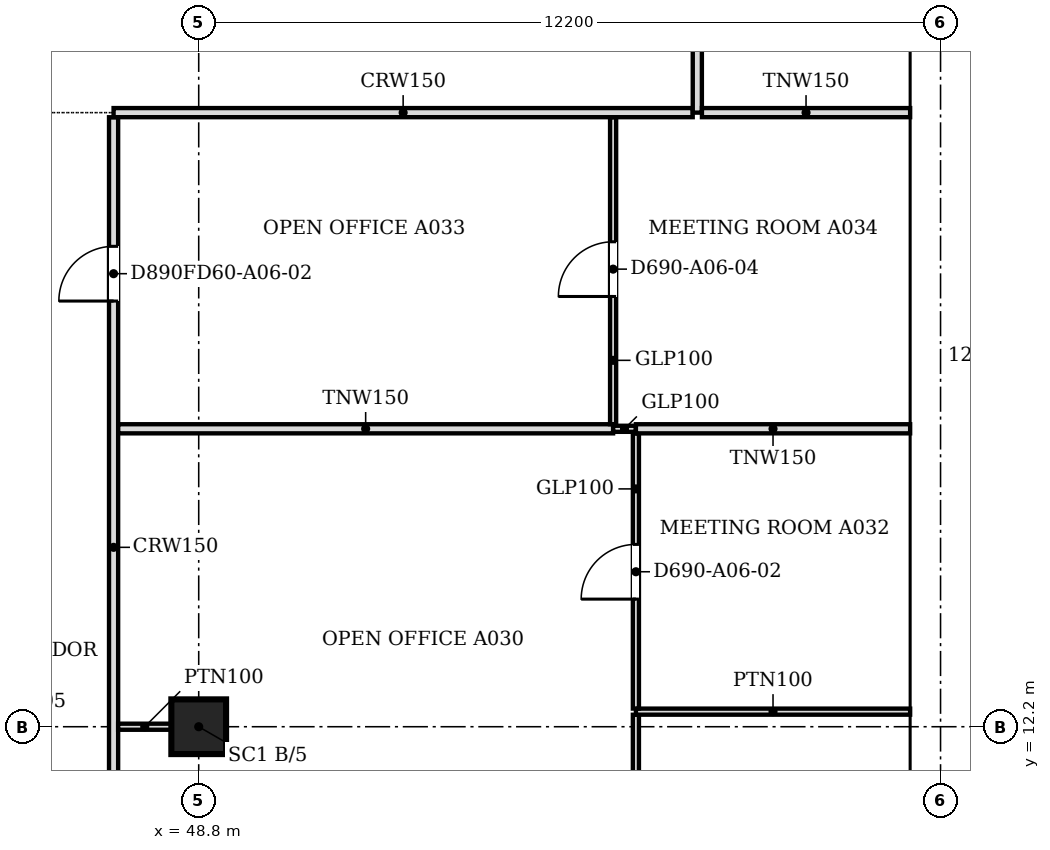
"""IFC4 building model, lengths in metres.
Left out: names, types, materials, properties, quantities, classifications, styles, units other than length and angle.
Written with IfcOpenShell. Run it as: python <this file> out.ifc"""

import sys

from ifc_helpers import new_model, si_unit, direction, frame, frame_2d, origin, origin_2d, place, context, subcontext, project, spatial, polyline, rectangle, outline, extrude, faceted_brep, source, transform, mapped, element, fill, save


model = new_model("IFC4")
c1 = context("Model", 3, precision=1e-05, world=origin(), true_north=direction((0.0, 1.0)))
c2 = subcontext(c1, "Body", "Model", "MODEL_VIEW")
j1 = project(units=[si_unit("LENGTHUNIT", "METRE"), si_unit("PLANEANGLEUNIT", "RADIAN")], contexts=[c1])
p1 = place(None, origin())
s1 = spatial("IfcSite", under=j1, at=p1, CompositionType="ELEMENT")
p2 = place(p1, origin())
s2 = spatial("IfcBuilding", under=s1, at=p2, CompositionType="ELEMENT")
p3 = place(p2, frame((0.0, 0.0, 68.6)))
s3 = spatial("IfcBuildingStorey", under=s2, at=p3, CompositionType="ELEMENT", Elevation=68.6)
p4 = place(p3, frame((48.8, 12.2, 0.0), z_axis=(0.0, 0.0, 1.0), x_axis=(1.0, 0.0, 0.0)))
e1 = element("IfcColumn", 1, at=p4, inside=s3, PredefinedType="COLUMN", context=c2, shape_type="SweptSolid", body=[
    extrude(rectangle(XDim=0.9, YDim=0.9, at=origin_2d()), origin(), (0.0, 0.0, 1.0), 3.6),
])
m1 = source(origin(), c2, "Body", "Brep", [
    faceted_brep([(6.053, -0.25, 0.0), (3.003, -0.25, 3.8), (0.0, -0.25, 0.0), (0.047, 0.25, 0.059), (3.003, 0.25, 3.8), (6.053, 0.25, 0.0), (0.047, 0.25, 0.0), (0.0, 0.0, 0.0)], [[[0, 1, 2]], [[3, 4, 5, 6]], [[5, 4, 1, 0]], [[4, 3, 7, 2, 1]], [[6, 5, 0, 2, 7]], [[6, 7, 3]]]),
])
p5 = place(p3, frame((60.75, 6.146, 0.0), z_axis=(0.0, 0.0, 1.0), x_axis=(0.0, 1.0, 0.0)))
e2 = element("IfcWall", 2, at=p5, inside=s3, PredefinedType="SOLIDWALL", context=c2, shape_type="MappedRepresentation", body=[
    mapped(m1, transform((0.0, 0.0, 0.0), scale=1.0)),
])
m2 = source(origin(), c2, "Body", "SweptSolid", [
    extrude(outline(polyline([(5.532, 0.25), (3.005, 3.399), (0.516, 0.25), (5.532, 0.25)])), frame((0.0, 0.26, 0.0), z_axis=(0.0, -1.0, 0.0), x_axis=(1.0, 0.0, 0.0)), (0.0, 0.0, 1.0), 0.52),
])
p6 = place(p5, origin())
e3 = element("IfcOpeningElement", 3, at=p6, cuts=e2, PredefinedType="OPENING", context=c2, shape_type="MappedRepresentation", body=[
    mapped(m2, transform((0.0, 0.0, 0.0), scale=1.0)),
])
m3 = source(origin(), c2, "Body", "SweptSolid", [
    extrude(outline(polyline([(6.1, 0.0), (3.05, 3.8), (0.0, 0.0), (6.1, 0.0)])), frame((0.0, 0.25, 0.0), z_axis=(0.0, -1.0, 0.0), x_axis=(1.0, 0.0, 0.0)), (0.0, 0.0, 1.0), 0.5),
])
p7 = place(p3, frame((60.75, 12.2, 0.0), z_axis=(0.0, 0.0, 1.0), x_axis=(0.0, 1.0, 0.0)))
e4 = element("IfcWall", 4, at=p7, inside=s3, PredefinedType="SOLIDWALL", context=c2, shape_type="MappedRepresentation", body=[
    mapped(m3, transform((0.0, 0.0, 0.0), scale=1.0)),
])
m4 = source(origin(), c2, "Body", "SweptSolid", [
    extrude(outline(polyline([(5.579, 0.25), (3.05, 3.4), (0.521, 0.25), (5.579, 0.25)])), frame((0.0, 0.26, 0.0), z_axis=(0.0, -1.0, 0.0), x_axis=(1.0, 0.0, 0.0)), (0.0, 0.0, 1.0), 0.52),
])
p8 = place(p7, origin())
e5 = element("IfcOpeningElement", 5, at=p8, cuts=e4, PredefinedType="OPENING", context=c2, shape_type="MappedRepresentation", body=[
    mapped(m4, transform((0.0, 0.0, 0.0), scale=1.0)),
])
m5 = source(origin(), c2, "Body", "Brep", [
    faceted_brep([(6.1, -0.25, 0.0), (3.05, -0.25, 3.8), (0.0, -0.25, 0.0), (6.1, -0.25, 0.0), (0.0, 0.25, 0.0), (3.05, 0.25, 3.8), (6.1, 0.25, 0.0), (6.1, 0.25, 0.0)], [[[0, 1, 2, 3]], [[4, 5, 6, 7]], [[6, 5, 1, 0]], [[5, 4, 2, 1]], [[4, 7, 3, 2]], [[3, 7, 6, 0]]]),
])
p9 = place(p3, frame((60.75, 18.3, 0.0), z_axis=(0.0, 0.0, 1.0), x_axis=(0.0, 1.0, 0.0)))
e6 = element("IfcWall", 6, at=p9, inside=s3, PredefinedType="SOLIDWALL", context=c2, shape_type="MappedRepresentation", body=[
    mapped(m5, transform((0.0, 0.0, 0.0), scale=1.0)),
])
p10 = place(p9, origin())
e7 = element("IfcOpeningElement", 7, at=p10, cuts=e6, PredefinedType="OPENING", context=c2, shape_type="MappedRepresentation", body=[
    mapped(m4, transform((0.0, 0.0, 0.0), scale=1.0)),
])
p11 = place(p2, frame((0.0, 0.0, 72.4)))
s4 = spatial("IfcBuildingStorey", under=s2, at=p11, CompositionType="ELEMENT", Elevation=72.4)
m6 = source(origin(), c2, "Body", "SweptSolid", [
    extrude(outline(polyline([(3.05, 0.0), (6.1, 3.8), (3.05, 7.6), (0.0, 3.8), (3.05, 0.0)])), frame((0.0, 0.25, 0.0), z_axis=(0.0, -1.0, 0.0), x_axis=(1.0, 0.0, 0.0)), (0.0, 0.0, 1.0), 0.5),
])
p12 = place(p11, frame((60.75, 9.15, -3.8), z_axis=(0.0, 0.0, 1.0), x_axis=(0.0, 1.0, 0.0)))
e8 = element("IfcWall", 8, at=p12, inside=s4, PredefinedType="SOLIDWALL", context=c2, shape_type="MappedRepresentation", body=[
    mapped(m6, transform((0.0, 0.0, 0.0), scale=1.0)),
])
m7 = source(origin(), c2, "Body", "SweptSolid", [
    extrude(outline(polyline([(3.05, 0.399), (5.78, 3.8), (3.05, 7.2), (0.321, 3.8), (3.05, 0.399)])), frame((0.0, 0.26, 0.0), z_axis=(0.0, -1.0, 0.0), x_axis=(1.0, 0.0, 0.0)), (0.0, 0.0, 1.0), 0.52),
])
p13 = place(p12, origin())
e9 = element("IfcOpeningElement", 9, at=p13, cuts=e8, PredefinedType="OPENING", context=c2, shape_type="MappedRepresentation", body=[
    mapped(m7, transform((0.0, 0.0, 0.0), scale=1.0)),
])
p14 = place(p11, frame((60.75, 15.25, -3.8), z_axis=(0.0, 0.0, 1.0), x_axis=(0.0, 1.0, 0.0)))
e10 = element("IfcWall", 10, at=p14, inside=s4, PredefinedType="SOLIDWALL", context=c2, shape_type="MappedRepresentation", body=[
    mapped(m6, transform((0.0, 0.0, 0.0), scale=1.0)),
])
p15 = place(p14, origin())
e11 = element("IfcOpeningElement", 11, at=p15, cuts=e10, PredefinedType="OPENING", context=c2, shape_type="MappedRepresentation", body=[
    mapped(m7, transform((0.0, 0.0, 0.0), scale=1.0)),
])
m8 = source(origin(), c2, "Body", "Brep", [
    faceted_brep([(3.05, -0.25, 0.0), (6.1, -0.25, 3.8), (6.1, -0.25, 3.8), (3.05, -0.25, 7.6), (0.0, -0.25, 3.8), (0.0, 0.25, 3.8), (3.05, 0.25, 7.6), (6.1, 0.25, 3.8), (6.1, 0.25, 3.8), (3.05, 0.25, 0.0)], [[[0, 1, 2, 3, 4]], [[5, 6, 7, 8, 9]], [[9, 8, 1, 0]], [[7, 6, 3, 2]], [[6, 5, 4, 3]], [[5, 9, 0, 4]], [[1, 8, 7, 2]]]),
])
p16 = place(p11, frame((60.75, 21.35, -3.8), z_axis=(0.0, 0.0, 1.0), x_axis=(0.0, 1.0, 0.0)))
e12 = element("IfcWall", 12, at=p16, inside=s4, PredefinedType="SOLIDWALL", context=c2, shape_type="MappedRepresentation", body=[
    mapped(m8, transform((0.0, 0.0, 0.0), scale=1.0)),
])
p17 = place(p16, origin())
e13 = element("IfcOpeningElement", 13, at=p17, cuts=e12, PredefinedType="OPENING", context=c2, shape_type="MappedRepresentation", body=[
    mapped(m7, transform((0.0, 0.0, 0.0), scale=1.0)),
])
p18 = place(p3, frame((47.4, 22.224, 0.0), z_axis=(0.0, 0.0, 1.0), x_axis=(0.0, -1.0, 0.0)))
e14 = element("IfcWall", 14, at=p18, inside=s3, PredefinedType="PARTITIONING", context=c2, shape_type="SweptSolid", body=[
    extrude(rectangle(XDim=18.024, YDim=0.15, at=frame_2d((9.012, 0.0))), origin(), (0.0, 0.0, 1.0), 3.067),
])
m9 = source(origin(), c2, "Body", "SweptSolid", [
    extrude(rectangle(XDim=0.9, YDim=2.1, at=frame_2d((0.45, 1.05))), frame((0.0, 0.085, 0.0), z_axis=(0.0, -1.0, 0.0), x_axis=(1.0, 0.0, 0.0)), (0.0, 0.0, 1.0), 0.17),
])
p19 = place(p18, frame((2.123, 0.0, 0.0)))
e15 = element("IfcOpeningElement", 15, at=p19, cuts=e14, PredefinedType="OPENING", context=c2, shape_type="MappedRepresentation", body=[
    mapped(m9, transform((0.0, 0.0, 0.0), scale=1.0)),
])
p20 = place(p18, frame((11.124, 0.0, 0.0)))
e16 = element("IfcOpeningElement", 16, at=p20, cuts=e14, PredefinedType="OPENING", context=c2, shape_type="MappedRepresentation", body=[
    mapped(m9, transform((0.0, 0.0, 0.0), scale=1.0)),
])
p21 = place(p3, frame((55.99, 12.397, 0.0), z_axis=(0.0, 0.0, 1.0), x_axis=(0.0, -1.0, 0.0)))
e17 = element("IfcWall", 17, at=p21, inside=s3, PredefinedType="PARTITIONING", context=c2, shape_type="SweptSolid", body=[
    extrude(rectangle(XDim=4.297, YDim=0.1, at=frame_2d((2.148, 0.0))), origin(), (0.0, 0.0, 1.0), 3.067),
])
m10 = source(origin(), c2, "Body", "SweptSolid", [
    extrude(rectangle(XDim=0.9, YDim=2.1, at=frame_2d((0.45, 1.05))), frame((0.0, 0.06, 0.0), z_axis=(0.0, -1.0, 0.0), x_axis=(1.0, 0.0, 0.0)), (0.0, 0.0, 1.0), 0.12),
])
p22 = place(p21, frame((1.697, 0.0, 0.0)))
e18 = element("IfcOpeningElement", 18, at=p22, cuts=e17, PredefinedType="OPENING", context=c2, shape_type="MappedRepresentation", body=[
    mapped(m10, transform((0.0, 0.0, 0.0), scale=1.0)),
])
p23 = place(p3, frame((48.35, 12.2, 0.0), z_axis=(0.0, 0.0, 1.0), x_axis=(-1.0, 0.0, 0.0)))
e19 = element("IfcWall", 19, at=p23, inside=s3, PredefinedType="PARTITIONING", context=c2, shape_type="SweptSolid", body=[
    extrude(rectangle(XDim=0.875, YDim=0.1, at=frame_2d((0.438, 0.0))), origin(), (0.0, 0.0, 1.0), 3.067),
])
p24 = place(p3, frame((55.99, 12.448, 0.0), z_axis=(0.0, 0.0, 1.0), x_axis=(1.0, 0.0, 0.0)))
e20 = element("IfcWall", 20, at=p24, inside=s3, PredefinedType="PARTITIONING", context=c2, shape_type="SweptSolid", body=[
    extrude(rectangle(XDim=4.51, YDim=0.1, at=frame_2d((2.255, 0.0))), origin(), (0.0, 0.0, 1.0), 3.067),
])
p25 = place(p3, frame((55.99, 17.024, 0.0), z_axis=(0.0, 0.0, 1.0), x_axis=(0.0, -1.0, 0.0)))
e21 = element("IfcWall", 21, at=p25, inside=s3, PredefinedType="PARTITIONING", context=c2, shape_type="SweptSolid", body=[
    extrude(rectangle(XDim=4.525, YDim=0.1, at=frame_2d((2.263, 0.0))), origin(), (0.0, 0.0, 1.0), 3.067),
])
p26 = place(p25, frame((1.825, 0.0, 0.0)))
e22 = element("IfcOpeningElement", 22, at=p26, cuts=e21, PredefinedType="OPENING", context=c2, shape_type="MappedRepresentation", body=[
    mapped(m10, transform((0.0, 0.0, 0.0), scale=1.0)),
])
p27 = place(p3, frame((47.476, 17.1, 0.0), z_axis=(0.0, 0.0, 1.0), x_axis=(1.0, 0.0, 0.0)))
e23 = element("IfcWall", 23, at=p27, inside=s3, PredefinedType="PARTITIONING", context=c2, shape_type="SweptSolid", body=[
    extrude(rectangle(XDim=8.139, YDim=0.15, at=frame_2d((4.069, 0.0))), origin(), (0.0, 0.0, 1.0), 3.067),
])
p28 = place(p3, frame((55.616, 17.1, 0.0), z_axis=(0.0, 0.0, 1.0), x_axis=(1.0, 0.0, 0.0)))
e24 = element("IfcWall", 24, at=p28, inside=s3, PredefinedType="PARTITIONING", context=c2, shape_type="SweptSolid", body=[
    extrude(rectangle(XDim=0.373, YDim=0.1, at=frame_2d((0.187, 0.0))), origin(), (0.0, 0.0, 1.0), 3.067),
])
p29 = place(p3, frame((55.99, 17.1, 0.0), z_axis=(0.0, 0.0, 1.0), x_axis=(1.0, 0.0, 0.0)))
e25 = element("IfcWall", 25, at=p29, inside=s3, PredefinedType="PARTITIONING", context=c2, shape_type="SweptSolid", body=[
    extrude(rectangle(XDim=4.51, YDim=0.15, at=frame_2d((2.255, 0.0))), origin(), (0.0, 0.0, 1.0), 3.067),
])
p30 = place(p3, frame((55.615, 22.224, 0.0), z_axis=(0.0, 0.0, 1.0), x_axis=(0.0, -1.0, 0.0)))
e26 = element("IfcWall", 26, at=p30, inside=s3, PredefinedType="PARTITIONING", context=c2, shape_type="SweptSolid", body=[
    extrude(rectangle(XDim=5.048, YDim=0.1, at=frame_2d((2.524, 0.0))), origin(), (0.0, 0.0, 1.0), 3.067),
])
p31 = place(p30, frame((2.048, 0.0, 0.0)))
e27 = element("IfcOpeningElement", 27, at=p31, cuts=e26, PredefinedType="OPENING", context=c2, shape_type="MappedRepresentation", body=[
    mapped(m10, transform((0.0, 0.0, 0.0), scale=1.0)),
])
p32 = place(p3, frame((47.4, 22.3, 0.0), z_axis=(0.0, 0.0, 1.0), x_axis=(1.0, 0.0, 0.0)))
e28 = element("IfcWall", 28, at=p32, inside=s3, PredefinedType="PARTITIONING", context=c2, shape_type="SweptSolid", body=[
    extrude(rectangle(XDim=9.524, YDim=0.15, at=frame_2d((4.762, 0.0))), origin(), (0.0, 0.0, 1.0), 3.067),
])
p33 = place(p3, frame((57.0, 30.6, 0.0), z_axis=(0.0, 0.0, 1.0), x_axis=(0.0, -1.0, 0.0)))
e29 = element("IfcWall", 29, at=p33, inside=s3, PredefinedType="PARTITIONING", context=c2, shape_type="SweptSolid", body=[
    extrude(rectangle(XDim=8.3, YDim=0.15, at=frame_2d((4.15, 0.0))), origin(), (0.0, 0.0, 1.0), 3.067),
])
p34 = place(p33, frame((3.7, 0.0, 0.0)))
e30 = element("IfcOpeningElement", 30, at=p34, cuts=e29, PredefinedType="OPENING", context=c2, shape_type="MappedRepresentation", body=[
    mapped(m9, transform((0.0, 0.0, 0.0), scale=1.0)),
])
p35 = place(p3, frame((57.076, 22.3, 0.0), z_axis=(0.0, 0.0, 1.0), x_axis=(1.0, 0.0, 0.0)))
e31 = element("IfcWall", 31, at=p35, inside=s3, PredefinedType="PARTITIONING", context=c2, shape_type="SweptSolid", body=[
    extrude(rectangle(XDim=3.424, YDim=0.15, at=frame_2d((1.712, 0.0))), origin(), (0.0, 0.0, 1.0), 3.067),
])
m11 = source(origin(), c2, "Body", "SweptSolid", [
    extrude(rectangle(XDim=0.9, YDim=2.1, at=frame_2d((0.45, 1.05))), frame((0.0, 0.025, 0.0), z_axis=(0.0, -1.0, 0.0), x_axis=(1.0, 0.0, 0.0)), (0.0, 0.0, 1.0), 0.05),
])
p36 = place(p26, origin())
e32 = element("IfcDoor", 32, at=p36, inside=s3, OperationType="SINGLE_SWING_RIGHT", PredefinedType="DOOR", context=c2, shape_type="MappedRepresentation", body=[
    mapped(m11, transform((0.0, 0.0, 0.0), scale=1.0)),
])
fill(e22, e32)
p37 = place(p31, origin())
e33 = element("IfcDoor", 33, at=p37, inside=s3, OperationType="SINGLE_SWING_RIGHT", PredefinedType="DOOR", context=c2, shape_type="MappedRepresentation", body=[
    mapped(m11, transform((0.0, 0.0, 0.0), scale=1.0)),
])
fill(e27, e33)
p38 = place(p19, origin())
e34 = element("IfcDoor", 34, at=p38, inside=s3, OperationType="SINGLE_SWING_RIGHT", PredefinedType="DOOR", context=c2, shape_type="MappedRepresentation", body=[
    mapped(m11, transform((0.0, 0.0, 0.0), scale=1.0)),
])
fill(e15, e34)
save(model, sys.argv[1])
